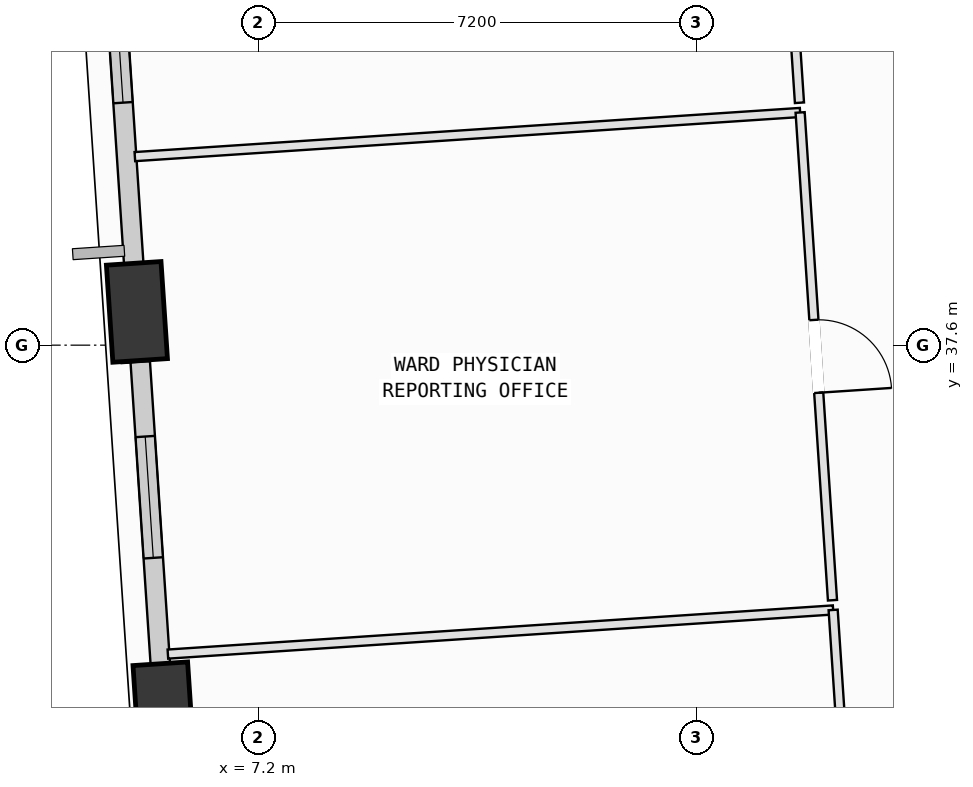
"""IFC4 building model, lengths in metres.
Left out: names, types, materials, properties, quantities, classifications, styles, units other than length and angle.
Written with IfcOpenShell. Run it as: python <this file> out.ifc"""

import sys

from ifc_helpers import new_model, si_unit, direction, frame, frame_2d, origin, origin_2d, place, context, subcontext, project, spatial, rectangle, extrude, element, fill, save


model = new_model("IFC4")
c1 = context("Model", 3, precision=1e-05, world=origin(), true_north=direction((0.0, 1.0)))
c2 = subcontext(c1, "Body", "Model", "MODEL_VIEW")
j1 = project(units=[si_unit("LENGTHUNIT", "METRE"), si_unit("PLANEANGLEUNIT", "RADIAN")], contexts=[c1])
p1 = place(None, origin())
s1 = spatial("IfcSite", under=j1, at=p1, CompositionType="ELEMENT")
p2 = place(p1, origin())
s2 = spatial("IfcBuilding", under=s1, at=p2, CompositionType="ELEMENT")
p3 = place(p2, frame((0.0, 0.0, 39.0)))
s3 = spatial("IfcBuildingStorey", under=s2, at=p3, CompositionType="ELEMENT", Elevation=39.0)
p4 = place(p3, frame((5.203, 38.147, 0.002), z_axis=(-0.053913337172, -0.117216075763, 0.991641943273), x_axis=(0.353252899311, 0.92662789024, 0.128736716433)))
e1 = element("IfcColumn", 1, at=p4, inside=s3, PredefinedType="COLUMN", context=c2, shape_type="SweptSolid", body=[
    extrude(rectangle(XDim=1.6, YDim=0.9, at=origin_2d()), origin(), (0.0, 0.0, 1.0), 4.03),
])
p5 = place(p3, frame((5.64, 31.562, 0.002), z_axis=(-0.026871346322, -0.115310224283, 0.992966002904), x_axis=(0.160317923428, 0.979970009184, 0.118139512983)))
e2 = element("IfcColumn", 2, at=p5, inside=s3, PredefinedType="COLUMN", context=c2, shape_type="SweptSolid", body=[
    extrude(rectangle(XDim=1.6, YDim=0.9, at=origin_2d()), origin(), (0.0, 0.0, 1.0), 4.025),
])
p6 = place(p3, frame((5.179, 38.513, 0.0), z_axis=(0.0, 0.0, 1.0), x_axis=(-0.066280128143, 0.997801054626, 0.0)))
e3 = element("IfcWall", 3, at=p6, inside=s3, PredefinedType="SOLIDWALL", context=c2, shape_type="SweptSolid", body=[
    extrude(rectangle(XDim=5.223, YDim=0.32, at=frame_2d((2.612, 0.0))), origin(), (0.0, 0.0, 1.0), 3.165),
])
p7 = place(p6, frame((3.083, 0.0, 0.75)))
e4 = element("IfcOpeningElement", 4, at=p7, cuts=e3, PredefinedType="OPENING", context=c2, shape_type="SweptSolid", body=[
    extrude(rectangle(XDim=1.6, YDim=1.95, at=frame_2d((0.8, 0.975))), frame((0.0, 0.17, 0.0), z_axis=(0.0, -1.0, 0.0), x_axis=(1.0, 0.0, 0.0)), (0.0, 0.0, 1.0), 0.34),
])
p8 = place(p3, frame((5.615, 31.937, 0.0), z_axis=(0.0, 0.0, 1.0), x_axis=(-0.066272972222, 0.997801529941, 0.0)))
e5 = element("IfcWall", 5, at=p8, inside=s3, PredefinedType="SOLIDWALL", context=c2, shape_type="SweptSolid", body=[
    extrude(rectangle(XDim=5.401, YDim=0.32, at=frame_2d((2.7, 0.0))), origin(), (0.0, 0.0, 1.0), 3.165),
])
p9 = place(p8, frame((2.17, 0.0, 0.75)))
e6 = element("IfcOpeningElement", 6, at=p9, cuts=e5, PredefinedType="OPENING", context=c2, shape_type="SweptSolid", body=[
    extrude(rectangle(XDim=2.0, YDim=1.95, at=frame_2d((1.0, 0.975))), frame((0.0, 0.17, 0.0), z_axis=(0.0, -1.0, 0.0), x_axis=(1.0, 0.0, 0.0)), (0.0, 0.0, 1.0), 0.34),
])
p10 = place(p3, frame((5.712, 32.519, 0.0), z_axis=(0.0, 0.0, 1.0), x_axis=(0.997805307983, 0.066216065736, 0.0)))
e7 = element("IfcWall", 7, at=p10, inside=s3, PredefinedType="PARTITIONING", context=c2, shape_type="SweptSolid", body=[
    extrude(rectangle(XDim=10.965, YDim=0.15, at=frame_2d((5.483, 0.0))), origin(), (0.0, 0.0, 1.0), 3.365),
])
p11 = place(p3, frame((16.653, 33.245, 0.0), z_axis=(0.0, 0.0, 1.0), x_axis=(0.066289247384, -0.997800448828, 0.0)))
e8 = element("IfcWall", 8, at=p11, inside=s3, PredefinedType="PARTITIONING", context=c2, shape_type="SweptSolid", body=[
    extrude(rectangle(XDim=8.04, YDim=0.15, at=frame_2d((4.02, 0.0))), origin(), (0.0, 0.0, 1.0), 3.78),
])
p12 = place(p11, frame((3.42, 0.0, 0.0)))
e9 = element("IfcOpeningElement", 9, at=p12, cuts=e8, PredefinedType="OPENING", context=c2, shape_type="SweptSolid", body=[
    extrude(rectangle(XDim=1.2, YDim=2.15, at=frame_2d((0.6, 1.075))), frame((0.0, 0.085, 0.0), z_axis=(0.0, -1.0, 0.0), x_axis=(1.0, 0.0, 0.0)), (0.0, 0.0, 1.0), 0.17),
])
p13 = place(p3, frame((5.466, 30.716, 0.0), z_axis=(0.0, 0.0, 1.0), x_axis=(-0.066250887221, 0.997802996559, 0.0)))
e10 = element("IfcWall", 10, at=p13, inside=s3, PredefinedType="PARTITIONING", context=c2, shape_type="SweptSolid", body=[
    extrude(rectangle(XDim=1.209, YDim=0.15, at=frame_2d((0.604, 0.0))), origin(), (0.0, 0.0, 1.0), 3.165),
])
p14 = place(p3, frame((5.169, 40.701, 0.0), z_axis=(0.0, 0.0, 1.0), x_axis=(0.997805307983, 0.066216065736, 0.0)))
e11 = element("IfcWall", 11, at=p14, inside=s3, PredefinedType="PARTITIONING", context=c2, shape_type="SweptSolid", body=[
    extrude(rectangle(XDim=10.965, YDim=0.15, at=frame_2d((5.483, 0.0))), origin(), (0.0, 0.0, 1.0), 3.78),
])
p15 = place(p3, frame((16.11, 41.427, 0.0), z_axis=(0.0, 0.0, 1.0), x_axis=(0.066170320126, -0.997808342686, 0.0)))
e12 = element("IfcWall", 12, at=p15, inside=s3, PredefinedType="PARTITIONING", context=c2, shape_type="SweptSolid", body=[
    extrude(rectangle(XDim=8.04, YDim=0.15, at=frame_2d((4.02, 0.0))), origin(), (0.0, 0.0, 1.0), 3.78),
])
p16 = place(p15, frame((3.42, 0.0, 0.0)))
e13 = element("IfcOpeningElement", 13, at=p16, cuts=e12, PredefinedType="OPENING", context=c2, shape_type="SweptSolid", body=[
    extrude(rectangle(XDim=1.2, YDim=2.15, at=frame_2d((0.6, 1.075))), frame((0.0, 0.085, 0.0), z_axis=(0.0, -1.0, 0.0), x_axis=(1.0, 0.0, 0.0)), (0.0, 0.0, 1.0), 0.17),
])
p17 = place(p3, frame((5.028, 37.31, 0.0), z_axis=(0.0, 0.0, 1.0), x_axis=(-0.066437351806, 0.997790598415, 0.0)))
e14 = element("IfcWall", 14, at=p17, inside=s3, PredefinedType="PARTITIONING", context=c2, shape_type="SweptSolid", body=[
    extrude(rectangle(XDim=1.191, YDim=0.15, at=frame_2d((0.595, 0.0))), origin(), (0.0, 0.0, 1.0), 3.165),
])
p18 = place(p3, frame((15.588, 49.28, 0.0), z_axis=(0.0, 0.0, 1.0), x_axis=(0.066306740692, -0.997799286499, 0.0)))
e15 = element("IfcWall", 15, at=p18, inside=s3, PredefinedType="PARTITIONING", context=c2, shape_type="SweptSolid", body=[
    extrude(rectangle(XDim=7.71, YDim=0.15, at=frame_2d((3.855, 0.0))), origin(), (0.0, 0.0, 1.0), 2.865),
])
p19 = place(p18, frame((3.255, 0.0, 0.0)))
e16 = element("IfcOpeningElement", 16, at=p19, cuts=e15, PredefinedType="OPENING", context=c2, shape_type="SweptSolid", body=[
    extrude(rectangle(XDim=1.2, YDim=2.15, at=frame_2d((0.6, 1.075))), frame((0.0, 0.085, 0.0), z_axis=(0.0, -1.0, 0.0), x_axis=(1.0, 0.0, 0.0)), (0.0, 0.0, 1.0), 0.17),
])
p20 = place(p7, origin())
e17 = element("IfcWindow", 17, at=p20, inside=s3, PartitioningType="SINGLE_PANEL", PredefinedType="WINDOW", context=c2, shape_type="SweptSolid", body=[
    extrude(rectangle(XDim=1.6, YDim=1.95, at=frame_2d((0.8, 0.975))), frame((0.0, 0.03, 0.0), z_axis=(0.0, -1.0, 0.0), x_axis=(1.0, 0.0, 0.0)), (0.0, 0.0, 1.0), 0.06),
])
fill(e4, e17)
p21 = place(p9, origin())
e18 = element("IfcWindow", 18, at=p21, inside=s3, PartitioningType="SINGLE_PANEL", PredefinedType="WINDOW", context=c2, shape_type="SweptSolid", body=[
    extrude(rectangle(XDim=2.0, YDim=1.95, at=frame_2d((1.0, 0.975))), frame((0.0, 0.03, 0.0), z_axis=(0.0, -1.0, 0.0), x_axis=(1.0, 0.0, 0.0)), (0.0, 0.0, 1.0), 0.06),
])
fill(e6, e18)
p22 = place(p16, origin())
e19 = element("IfcDoor", 19, at=p22, inside=s3, OperationType="SINGLE_SWING_RIGHT", PredefinedType="DOOR", context=c2, shape_type="SweptSolid", body=[
    extrude(rectangle(XDim=1.2, YDim=2.15, at=frame_2d((0.6, 1.075))), frame((0.0, 0.025, 0.0), z_axis=(0.0, -1.0, 0.0), x_axis=(1.0, 0.0, 0.0)), (0.0, 0.0, 1.0), 0.05),
])
fill(e13, e19)
save(model, sys.argv[1])
